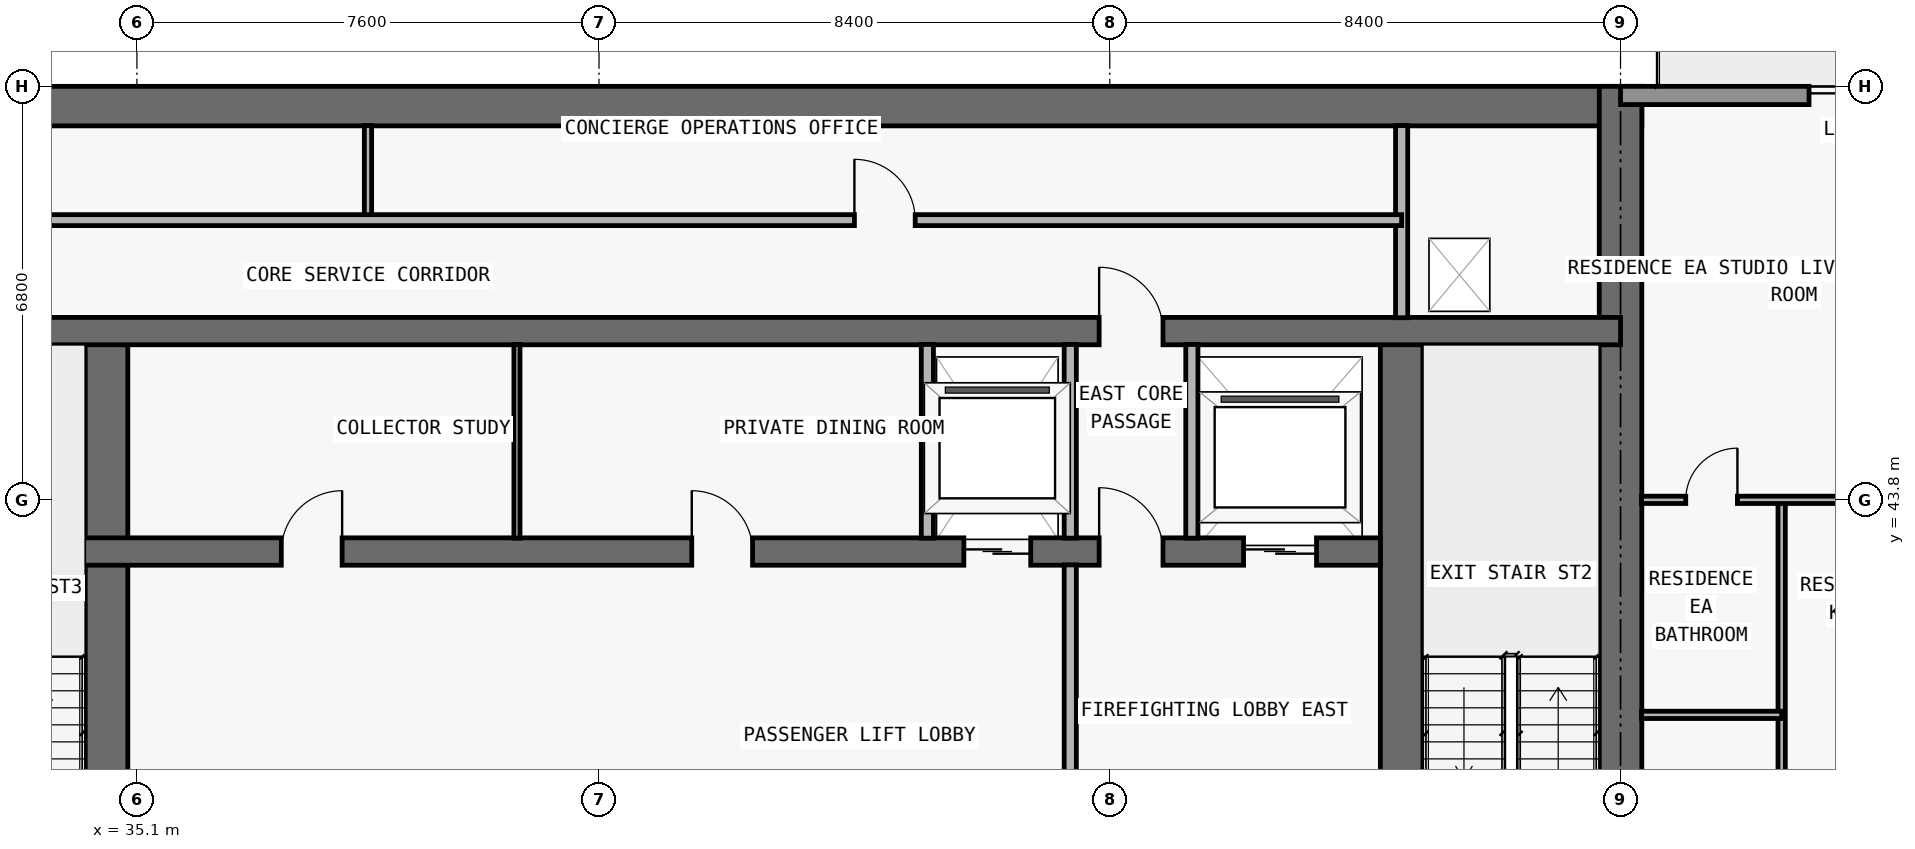
"""IFC4 building model, lengths in metres.
Left out: names, types, materials, properties, quantities, classifications, styles, units other than length and angle.
Written with IfcOpenShell. Run it as: python <this file> out.ifc"""

import sys

from ifc_helpers import new_model, si_unit, direction, frame, frame_2d, origin, place, context, subcontext, project, spatial, rectangle, extrude, element, fill, save


model = new_model("IFC4")
c1 = context("Model", 3, precision=1e-05, world=origin(), true_north=direction((0.0, 1.0)))
c2 = subcontext(c1, "Body", "Model", "MODEL_VIEW")
j1 = project(units=[si_unit("LENGTHUNIT", "METRE"), si_unit("PLANEANGLEUNIT", "RADIAN")], contexts=[c1])
p1 = place(None, origin())
s1 = spatial("IfcSite", under=j1, at=p1, CompositionType="ELEMENT")
p2 = place(p1, origin())
s2 = spatial("IfcBuilding", under=s1, at=p2, CompositionType="ELEMENT")
p3 = place(p2, frame((0.0, 0.0, 195.0)))
s3 = spatial("IfcBuildingStorey", under=s2, at=p3, CompositionType="ELEMENT", Elevation=195.0)
p4 = place(p3, frame((17.95, 50.275, 0.0), z_axis=(0.0, 0.0, 1.0), x_axis=(1.0, 0.0, 0.0)))
e1 = element("IfcWall", 1, at=p4, inside=s3, PredefinedType="SHEAR", context=c2, shape_type="SweptSolid", body=[
    extrude(rectangle(XDim=41.9, YDim=0.65, at=frame_2d((20.95, 0.0))), origin(), (0.0, 0.0, 1.0), 3.05),
])
p5 = place(p3, frame((59.5, 36.65, 0.0), z_axis=(0.0, 0.0, 1.0), x_axis=(0.0, 1.0, 0.0)))
e2 = element("IfcWall", 2, at=p5, inside=s3, PredefinedType="SHEAR", context=c2, shape_type="SweptSolid", body=[
    extrude(rectangle(XDim=13.95, YDim=0.7, at=frame_2d((6.975, 0.0))), origin(), (0.0, 0.0, 1.0), 3.05),
])
p6 = place(p3, frame((55.9, 37.0, 0.0), z_axis=(0.0, 0.0, 1.0), x_axis=(0.0, 1.0, 0.0)))
e3 = element("IfcWall", 3, at=p6, inside=s3, PredefinedType="SHEAR", context=c2, shape_type="SweptSolid", body=[
    extrude(rectangle(XDim=9.575, YDim=0.7, at=frame_2d((4.788, 0.0))), origin(), (0.0, 0.0, 1.0), 3.05),
])
p7 = place(p6, frame((0.55, 0.0, 0.0)))
e4 = element("IfcOpeningElement", 4, at=p7, cuts=e3, PredefinedType="OPENING", context=c2, shape_type="SweptSolid", body=[
    extrude(rectangle(XDim=1.1, YDim=2.15, at=frame_2d((0.55, 1.075))), frame((0.0, 0.36, 0.0), z_axis=(0.0, -1.0, 0.0), x_axis=(1.0, 0.0, 0.0)), (0.0, 0.0, 1.0), 0.72),
])
p8 = place(p3, frame((34.6, 37.0, 0.0), z_axis=(0.0, 0.0, 1.0), x_axis=(0.0, 1.0, 0.0)))
e5 = element("IfcWall", 5, at=p8, inside=s3, PredefinedType="SHEAR", context=c2, shape_type="SweptSolid", body=[
    extrude(rectangle(XDim=9.575, YDim=0.7, at=frame_2d((4.788, 0.0))), origin(), (0.0, 0.0, 1.0), 3.05),
])
p9 = place(p3, frame((22.25, 42.95, 0.0), z_axis=(0.0, 0.0, 1.0), x_axis=(1.0, 0.0, 0.0)))
e6 = element("IfcWall", 6, at=p9, inside=s3, PredefinedType="SHEAR", context=c2, shape_type="SweptSolid", body=[
    extrude(rectangle(XDim=33.3, YDim=0.45, at=frame_2d((16.65, 0.0))), origin(), (0.0, 0.0, 1.0), 3.05),
])
p10 = place(p9, frame((1.05, 0.0, 0.0)))
e7 = element("IfcOpeningElement", 7, at=p10, cuts=e6, PredefinedType="OPENING", context=c2, shape_type="SweptSolid", body=[
    extrude(rectangle(XDim=1.2, YDim=2.2, at=frame_2d((0.6, 1.1))), frame((0.0, 0.235, 0.0), z_axis=(0.0, -1.0, 0.0), x_axis=(1.0, 0.0, 0.0)), (0.0, 0.0, 1.0), 0.47),
])
p11 = place(p9, frame((31.05, 0.0, 0.0)))
e8 = element("IfcOpeningElement", 8, at=p11, cuts=e6, PredefinedType="OPENING", context=c2, shape_type="SweptSolid", body=[
    extrude(rectangle(XDim=1.2, YDim=2.2, at=frame_2d((0.6, 1.1))), frame((0.0, 0.235, 0.0), z_axis=(0.0, -1.0, 0.0), x_axis=(1.0, 0.0, 0.0)), (0.0, 0.0, 1.0), 0.47),
])
p12 = place(p9, frame((26.45, 0.0, 0.0)))
e9 = element("IfcOpeningElement", 9, at=p12, cuts=e6, PredefinedType="OPENING", context=c2, shape_type="SweptSolid", body=[
    extrude(rectangle(XDim=1.1, YDim=2.2, at=frame_2d((0.55, 1.1))), frame((0.0, 0.235, 0.0), z_axis=(0.0, -1.0, 0.0), x_axis=(1.0, 0.0, 0.0)), (0.0, 0.0, 1.0), 0.47),
])
p13 = place(p9, frame((5.95, 0.0, 0.0)))
e10 = element("IfcOpeningElement", 10, at=p13, cuts=e6, PredefinedType="OPENING", context=c2, shape_type="SweptSolid", body=[
    extrude(rectangle(XDim=1.1, YDim=2.2, at=frame_2d((0.55, 1.1))), frame((0.0, 0.235, 0.0), z_axis=(0.0, -1.0, 0.0), x_axis=(1.0, 0.0, 0.0)), (0.0, 0.0, 1.0), 0.47),
])
p14 = place(p9, frame((3.625, 0.0, 0.0)))
e11 = element("IfcOpeningElement", 11, at=p14, cuts=e6, PredefinedType="OPENING", context=c2, shape_type="SweptSolid", body=[
    extrude(rectangle(XDim=1.05, YDim=2.15, at=frame_2d((0.525, 1.075))), frame((0.0, 0.235, 0.0), z_axis=(0.0, -1.0, 0.0), x_axis=(1.0, 0.0, 0.0)), (0.0, 0.0, 1.0), 0.47),
])
p15 = place(p9, frame((28.675, 0.0, 0.0)))
e12 = element("IfcOpeningElement", 12, at=p15, cuts=e6, PredefinedType="OPENING", context=c2, shape_type="SweptSolid", body=[
    extrude(rectangle(XDim=1.05, YDim=2.15, at=frame_2d((0.525, 1.075))), frame((0.0, 0.235, 0.0), z_axis=(0.0, -1.0, 0.0), x_axis=(1.0, 0.0, 0.0)), (0.0, 0.0, 1.0), 0.47),
])
p16 = place(p9, frame((15.225, 0.0, 0.0)))
e13 = element("IfcOpeningElement", 13, at=p16, cuts=e6, PredefinedType="OPENING", context=c2, shape_type="SweptSolid", body=[
    extrude(rectangle(XDim=1.0, YDim=2.2, at=frame_2d((0.5, 1.1))), frame((0.0, 0.235, 0.0), z_axis=(0.0, -1.0, 0.0), x_axis=(1.0, 0.0, 0.0)), (0.0, 0.0, 1.0), 0.47),
])
p17 = place(p9, frame((21.975, 0.0, 0.0)))
e14 = element("IfcOpeningElement", 14, at=p17, cuts=e6, PredefinedType="OPENING", context=c2, shape_type="SweptSolid", body=[
    extrude(rectangle(XDim=1.0, YDim=2.2, at=frame_2d((0.5, 1.1))), frame((0.0, 0.235, 0.0), z_axis=(0.0, -1.0, 0.0), x_axis=(1.0, 0.0, 0.0)), (0.0, 0.0, 1.0), 0.47),
])
p18 = place(p3, frame((18.3, 46.575, 0.0), z_axis=(0.0, 0.0, 1.0), x_axis=(1.0, 0.0, 0.0)))
e15 = element("IfcWall", 15, at=p18, inside=s3, PredefinedType="SHEAR", context=c2, shape_type="SweptSolid", body=[
    extrude(rectangle(XDim=41.2, YDim=0.45, at=frame_2d((20.6, 0.0))), origin(), (0.0, 0.0, 1.0), 3.05),
])
p19 = place(p18, frame((7.575, 0.0, 0.0)))
e16 = element("IfcOpeningElement", 16, at=p19, cuts=e15, PredefinedType="OPENING", context=c2, shape_type="SweptSolid", body=[
    extrude(rectangle(XDim=1.05, YDim=2.15, at=frame_2d((0.525, 1.075))), frame((0.0, 0.235, 0.0), z_axis=(0.0, -1.0, 0.0), x_axis=(1.0, 0.0, 0.0)), (0.0, 0.0, 1.0), 0.47),
])
p20 = place(p18, frame((32.625, 0.0, 0.0)))
e17 = element("IfcOpeningElement", 17, at=p20, cuts=e15, PredefinedType="OPENING", context=c2, shape_type="SweptSolid", body=[
    extrude(rectangle(XDim=1.05, YDim=2.15, at=frame_2d((0.525, 1.075))), frame((0.0, 0.235, 0.0), z_axis=(0.0, -1.0, 0.0), x_axis=(1.0, 0.0, 0.0)), (0.0, 0.0, 1.0), 0.47),
])
p21 = place(p3, frame((59.5, 50.45, 0.0), z_axis=(0.0, 0.0, 1.0), x_axis=(1.0, 0.0, 0.0)))
e18 = element("IfcWall", 18, at=p21, inside=s3, PredefinedType="STANDARD", context=c2, shape_type="SweptSolid", body=[
    extrude(rectangle(XDim=8.2, YDim=0.3, at=frame_2d((4.1, 0.0))), origin(), (0.0, 0.0, 1.0), 3.05),
])
p22 = place(p21, frame((3.1, 0.0, 0.0)))
e19 = element("IfcOpeningElement", 19, at=p22, cuts=e18, PredefinedType="OPENING", context=c2, shape_type="SweptSolid", body=[
    extrude(rectangle(XDim=2.0, YDim=2.3, at=frame_2d((1.0, 1.15))), frame((0.0, 0.16, 0.0), z_axis=(0.0, -1.0, 0.0), x_axis=(1.0, 0.0, 0.0)), (0.0, 0.0, 1.0), 0.32),
])
p23 = place(p3, frame((38.9, 48.4, 0.0), z_axis=(0.0, 0.0, 1.0), x_axis=(0.0, 1.0, 0.0)))
e20 = element("IfcWall", 20, at=p23, inside=s3, PredefinedType="PARTITIONING", context=c2, shape_type="SweptSolid", body=[
    extrude(rectangle(XDim=1.555, YDim=0.12, at=frame_2d((0.778, 0.0))), origin(), (0.0, 0.0, 1.0), 3.05),
])
p24 = place(p3, frame((41.35, 43.17, 0.0), z_axis=(0.0, 0.0, 1.0), x_axis=(0.0, 1.0, 0.0)))
e21 = element("IfcWall", 21, at=p24, inside=s3, PredefinedType="MOVABLE", context=c2, shape_type="SweptSolid", body=[
    extrude(rectangle(XDim=3.185, YDim=0.1, at=frame_2d((1.593, 0.0))), origin(), (0.0, 0.0, 1.0), 3.05),
])
p25 = place(p3, frame((48.1, 43.17, 0.0), z_axis=(0.0, 0.0, 1.0), x_axis=(0.0, 1.0, 0.0)))
e22 = element("IfcWall", 22, at=p25, inside=s3, PredefinedType="PARTITIONING", context=c2, shape_type="SweptSolid", body=[
    extrude(rectangle(XDim=3.185, YDim=0.2, at=frame_2d((1.593, 0.0))), origin(), (0.0, 0.0, 1.0), 3.05),
])
p26 = place(p3, frame((50.45, 37.345, 0.0), z_axis=(0.0, 0.0, 1.0), x_axis=(0.0, 1.0, 0.0)))
e23 = element("IfcWall", 23, at=p26, inside=s3, PredefinedType="PARTITIONING", context=c2, shape_type="SweptSolid", body=[
    extrude(rectangle(XDim=5.385, YDim=0.2, at=frame_2d((2.692, 0.0))), origin(), (0.0, 0.0, 1.0), 3.05),
])
for number, where, z_axis, x_axis in (
    (24, (50.45, 43.17, 0.0), (0.0, 0.0, 1.0), (0.0, 1.0, 0.0)),
    (25, (52.45, 43.17, 0.0), (0.0, 0.0, 1.0), (0.0, 1.0, 0.0)),
):
    element("IfcWall", number, at=place(p3, frame(where, z_axis=z_axis, x_axis=x_axis)), inside=s3, PredefinedType="PARTITIONING", context=c2, shape_type="SweptSolid", body=[
        extrude(rectangle(XDim=3.185, YDim=0.2, at=frame_2d((1.593, 0.0))), origin(), (0.0, 0.0, 1.0), 3.05),
    ])
p27 = place(p3, frame((55.9, 46.795, 0.0), z_axis=(0.0, 0.0, 1.0), x_axis=(0.0, 1.0, 0.0)))
e26 = element("IfcWall", 26, at=p27, inside=s3, PredefinedType="PARTITIONING", context=c2, shape_type="SweptSolid", body=[
    extrude(rectangle(XDim=3.16, YDim=0.2, at=frame_2d((1.58, 0.0))), origin(), (0.0, 0.0, 1.0), 3.05),
])
p28 = place(p3, frame((62.15, 37.0, 0.0), z_axis=(0.0, 0.0, 1.0), x_axis=(0.0, 1.0, 0.0)))
e27 = element("IfcWall", 27, at=p28, inside=s3, PredefinedType="PARTITIONING", context=c2, shape_type="SweptSolid", body=[
    extrude(rectangle(XDim=6.8, YDim=0.12, at=frame_2d((3.4, 0.0))), origin(), (0.0, 0.0, 1.0), 3.05),
])
p29 = place(p28, frame((1.207, 0.0, 0.0)))
e28 = element("IfcOpeningElement", 28, at=p29, cuts=e27, PredefinedType="OPENING", context=c2, shape_type="SweptSolid", body=[
    extrude(rectangle(XDim=0.85, YDim=2.1, at=frame_2d((0.425, 1.05))), frame((0.0, 0.07, 0.0), z_axis=(0.0, -1.0, 0.0), x_axis=(1.0, 0.0, 0.0)), (0.0, 0.0, 1.0), 0.14),
])
p30 = place(p3, frame((59.845, 40.264, 0.0), z_axis=(0.0, 0.0, 1.0), x_axis=(1.0, 0.0, 0.0)))
e29 = element("IfcWall", 29, at=p30, inside=s3, PredefinedType="PARTITIONING", context=c2, shape_type="SweptSolid", body=[
    extrude(rectangle(XDim=2.305, YDim=0.12, at=frame_2d((1.152, 0.0))), origin(), (0.0, 0.0, 1.0), 3.05),
])
p31 = place(p3, frame((59.845, 43.8, 0.0), z_axis=(0.0, 0.0, 1.0), x_axis=(1.0, 0.0, 0.0)))
e30 = element("IfcWall", 30, at=p31, inside=s3, PredefinedType="PARTITIONING", context=c2, shape_type="SweptSolid", body=[
    extrude(rectangle(XDim=11.56, YDim=0.12, at=frame_2d((5.78, 0.0))), origin(), (0.0, 0.0, 1.0), 2.418),
])
p32 = place(p31, frame((3.409, 0.0, 0.0)))
e31 = element("IfcOpeningElement", 31, at=p32, cuts=e30, PredefinedType="OPENING", context=c2, shape_type="SweptSolid", body=[
    extrude(rectangle(XDim=0.9, YDim=2.15, at=frame_2d((0.45, 1.075))), frame((0.0, 0.07, 0.0), z_axis=(0.0, -1.0, 0.0), x_axis=(1.0, 0.0, 0.0)), (0.0, 0.0, 1.0), 0.14),
])
p33 = place(p31, frame((0.728, 0.0, 0.0)))
e32 = element("IfcOpeningElement", 32, at=p33, cuts=e30, PredefinedType="OPENING", context=c2, shape_type="SweptSolid", body=[
    extrude(rectangle(XDim=0.85, YDim=2.1, at=frame_2d((0.425, 1.05))), frame((0.0, 0.07, 0.0), z_axis=(0.0, -1.0, 0.0), x_axis=(1.0, 0.0, 0.0)), (0.0, 0.0, 1.0), 0.14),
])
p34 = place(p3, frame((21.9, 48.4, 0.0), z_axis=(0.0, 0.0, 1.0), x_axis=(1.0, 0.0, 0.0)))
e33 = element("IfcWall", 33, at=p34, inside=s3, PredefinedType="PARTITIONING", context=c2, shape_type="SweptSolid", body=[
    extrude(rectangle(XDim=34.0, YDim=0.18, at=frame_2d((17.0, 0.0))), origin(), (0.0, 0.0, 1.0), 3.05),
])
p35 = place(p34, frame((8.0, 0.0, 0.0)))
e34 = element("IfcOpeningElement", 34, at=p35, cuts=e33, PredefinedType="OPENING", context=c2, shape_type="SweptSolid", body=[
    extrude(rectangle(XDim=1.0, YDim=2.2, at=frame_2d((0.5, 1.1))), frame((0.0, 0.1, 0.0), z_axis=(0.0, -1.0, 0.0), x_axis=(1.0, 0.0, 0.0)), (0.0, 0.0, 1.0), 0.2),
])
p36 = place(p34, frame((25.0, 0.0, 0.0)))
e35 = element("IfcOpeningElement", 35, at=p36, cuts=e33, PredefinedType="OPENING", context=c2, shape_type="SweptSolid", body=[
    extrude(rectangle(XDim=1.0, YDim=2.2, at=frame_2d((0.5, 1.1))), frame((0.0, 0.1, 0.0), z_axis=(0.0, -1.0, 0.0), x_axis=(1.0, 0.0, 0.0)), (0.0, 0.0, 1.0), 0.2),
])
p37 = place(p22, origin())
e36 = element("IfcDoor", 36, at=p37, inside=s3, OperationType="DOUBLE_DOOR_SLIDING", PredefinedType="DOOR", context=c2, shape_type="SweptSolid", body=[
    extrude(rectangle(XDim=2.0, YDim=2.3, at=frame_2d((1.0, 1.15))), frame((0.0, 0.025, 0.0), z_axis=(0.0, -1.0, 0.0), x_axis=(1.0, 0.0, 0.0)), (0.0, 0.0, 1.0), 0.05),
])
fill(e19, e36)
p38 = place(p11, origin())
e37 = element("IfcDoor", 37, at=p38, inside=s3, OperationType="DOUBLE_DOOR_SLIDING", PredefinedType="DOOR", context=c2, shape_type="SweptSolid", body=[
    extrude(rectangle(XDim=1.2, YDim=2.2, at=frame_2d((0.6, 1.1))), frame((0.0, 0.025, 0.0), z_axis=(0.0, -1.0, 0.0), x_axis=(1.0, 0.0, 0.0)), (0.0, 0.0, 1.0), 0.05),
])
fill(e8, e37)
p39 = place(p12, origin())
e38 = element("IfcDoor", 38, at=p39, inside=s3, OperationType="DOUBLE_DOOR_SLIDING", PredefinedType="DOOR", context=c2, shape_type="SweptSolid", body=[
    extrude(rectangle(XDim=1.1, YDim=2.2, at=frame_2d((0.55, 1.1))), frame((0.0, 0.025, 0.0), z_axis=(0.0, -1.0, 0.0), x_axis=(1.0, 0.0, 0.0)), (0.0, 0.0, 1.0), 0.05),
])
fill(e9, e38)
p40 = place(p15, origin())
e39 = element("IfcDoor", 39, at=p40, inside=s3, OperationType="SINGLE_SWING_LEFT", PredefinedType="DOOR", context=c2, shape_type="SweptSolid", body=[
    extrude(rectangle(XDim=1.05, YDim=2.15, at=frame_2d((0.525, 1.075))), frame((0.0, 0.025, 0.0), z_axis=(0.0, -1.0, 0.0), x_axis=(1.0, 0.0, 0.0)), (0.0, 0.0, 1.0), 0.05),
])
fill(e12, e39)
p41 = place(p16, origin())
e40 = element("IfcDoor", 40, at=p41, inside=s3, OperationType="SINGLE_SWING_RIGHT", PredefinedType="DOOR", context=c2, shape_type="SweptSolid", body=[
    extrude(rectangle(XDim=1.0, YDim=2.2, at=frame_2d((0.5, 1.1))), frame((0.0, 0.025, 0.0), z_axis=(0.0, -1.0, 0.0), x_axis=(1.0, 0.0, 0.0)), (0.0, 0.0, 1.0), 0.05),
])
fill(e13, e40)
p42 = place(p17, origin())
e41 = element("IfcDoor", 41, at=p42, inside=s3, OperationType="SINGLE_SWING_LEFT", PredefinedType="DOOR", context=c2, shape_type="SweptSolid", body=[
    extrude(rectangle(XDim=1.0, YDim=2.2, at=frame_2d((0.5, 1.1))), frame((0.0, 0.025, 0.0), z_axis=(0.0, -1.0, 0.0), x_axis=(1.0, 0.0, 0.0)), (0.0, 0.0, 1.0), 0.05),
])
fill(e14, e41)
p43 = place(p20, origin())
e42 = element("IfcDoor", 42, at=p43, inside=s3, OperationType="SINGLE_SWING_LEFT", PredefinedType="DOOR", context=c2, shape_type="SweptSolid", body=[
    extrude(rectangle(XDim=1.05, YDim=2.15, at=frame_2d((0.525, 1.075))), frame((0.0, 0.025, 0.0), z_axis=(0.0, -1.0, 0.0), x_axis=(1.0, 0.0, 0.0)), (0.0, 0.0, 1.0), 0.05),
])
fill(e17, e42)
p44 = place(p36, origin())
e43 = element("IfcDoor", 43, at=p44, inside=s3, OperationType="SINGLE_SWING_LEFT", PredefinedType="DOOR", context=c2, shape_type="SweptSolid", body=[
    extrude(rectangle(XDim=1.0, YDim=2.2, at=frame_2d((0.5, 1.1))), frame((0.0, 0.025, 0.0), z_axis=(0.0, -1.0, 0.0), x_axis=(1.0, 0.0, 0.0)), (0.0, 0.0, 1.0), 0.05),
])
fill(e35, e43)
p45 = place(p33, origin())
e44 = element("IfcDoor", 44, at=p45, inside=s3, OperationType="SINGLE_SWING_RIGHT", PredefinedType="DOOR", context=c2, shape_type="SweptSolid", body=[
    extrude(rectangle(XDim=0.85, YDim=2.1, at=frame_2d((0.425, 1.05))), frame((0.0, 0.025, 0.0), z_axis=(0.0, -1.0, 0.0), x_axis=(1.0, 0.0, 0.0)), (0.0, 0.0, 1.0), 0.05),
])
fill(e32, e44)
save(model, sys.argv[1])
